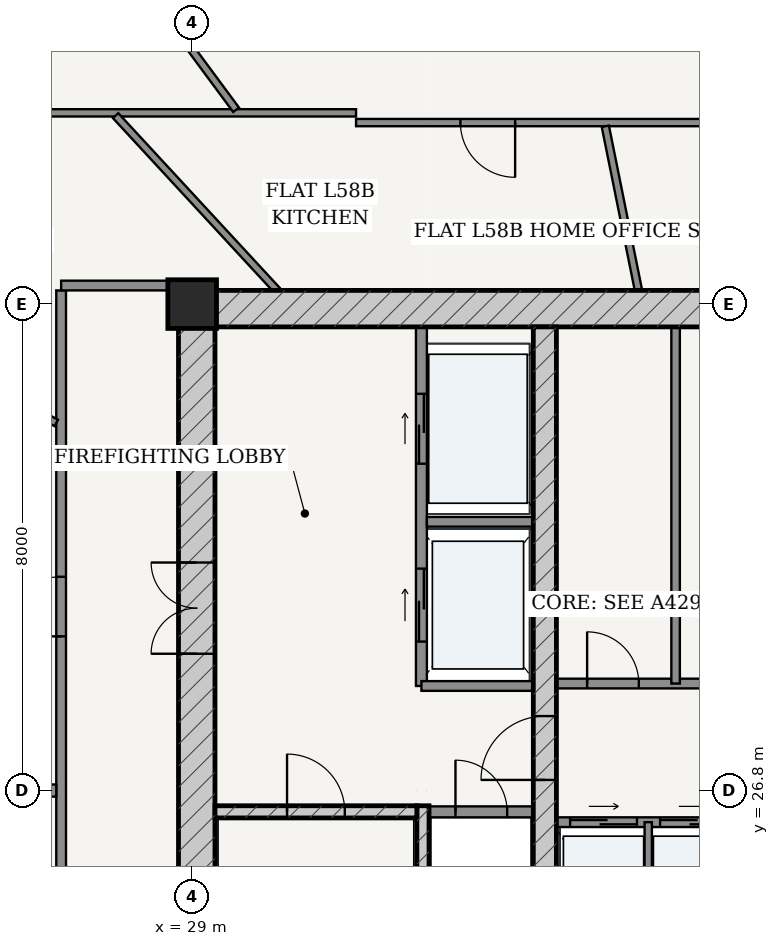
"""IFC4 building model, lengths in metres.
Left out: names, types, materials, properties, quantities, classifications, styles, units other than length and angle.
Written with IfcOpenShell. Run it as: python <this file> out.ifc"""

import sys

from ifc_helpers import new_model, si_unit, direction, frame, frame_2d, origin, origin_2d, place, context, subcontext, project, spatial, rectangle, extrude, source, transform, mapped, element, fill, save


model = new_model("IFC4")
c1 = context("Model", 3, precision=1e-05, world=origin(), true_north=direction((-0.2419218956, 0.970295726276)))
c2 = subcontext(c1, "Body", "Model", "MODEL_VIEW")
j1 = project(units=[si_unit("LENGTHUNIT", "METRE"), si_unit("PLANEANGLEUNIT", "RADIAN")], contexts=[c1])
p1 = place(None, origin())
s1 = spatial("IfcSite", under=j1, at=p1, CompositionType="ELEMENT")
p2 = place(p1, origin())
s2 = spatial("IfcBuilding", under=s1, at=p2, CompositionType="ELEMENT")
p3 = place(p2, frame((0.0, 0.0, 220.8)))
s3 = spatial("IfcBuildingStorey", under=s2, at=p3, CompositionType="ELEMENT", Elevation=220.8)
p4 = place(p3, frame((29.0, 34.8, 0.0), z_axis=(0.0, 0.0, 1.0), x_axis=(1.0, 0.0, 0.0)))
e1 = element("IfcColumn", 1, at=p4, inside=s3, PredefinedType="COLUMN", context=c2, shape_type="SweptSolid", body=[
    extrude(rectangle(XDim=0.8, YDim=0.8, at=origin_2d()), origin(), (0.0, 0.0, 1.0), 3.7),
])
p5 = place(p3, frame((28.775, 34.725, 0.0), z_axis=(0.0, 0.0, 1.0), x_axis=(1.0, 0.0, 0.0)))
e2 = element("IfcWall", 2, at=p5, inside=s3, PredefinedType="SHEAR", context=c2, shape_type="SweptSolid", body=[
    extrude(rectangle(XDim=18.45, YDim=0.6, at=frame_2d((9.225, 0.0))), origin(), (0.0, 0.0, 1.0), 3.435),
])
p6 = place(p3, frame((29.075, 19.175, 0.0), z_axis=(0.0, 0.0, 1.0), x_axis=(0.0, 1.0, 0.0)))
e3 = element("IfcWall", 3, at=p6, inside=s3, PredefinedType="SHEAR", context=c2, shape_type="SweptSolid", body=[
    extrude(rectangle(XDim=15.25, YDim=0.6, at=frame_2d((7.625, 0.0))), origin(), (0.0, 0.0, 1.0), 3.435),
])
p7 = place(p6, frame((9.875, 0.0, 0.0)))
e4 = element("IfcOpeningElement", 4, at=p7, cuts=e3, PredefinedType="OPENING", context=c2, shape_type="SweptSolid", body=[
    extrude(rectangle(XDim=1.5, YDim=2.2, at=frame_2d((0.75, 1.1))), frame((0.0, 0.31, 0.0), z_axis=(0.0, -1.0, 0.0), x_axis=(1.0, 0.0, 0.0)), (0.0, 0.0, 1.0), 0.62),
])
p8 = place(p3, frame((32.795, 19.175, 0.0), z_axis=(0.0, 0.0, 1.0), x_axis=(0.0, 1.0, 0.0)))
e5 = element("IfcWall", 5, at=p8, inside=s3, PredefinedType="SOLIDWALL", context=c2, shape_type="SweptSolid", body=[
    extrude(rectangle(XDim=7.375, YDim=0.2, at=frame_2d((3.688, 0.0))), origin(), (0.0, 0.0, 1.0), 3.435),
])
p9 = place(p3, frame((29.375, 26.45, 0.0), z_axis=(0.0, 0.0, 1.0), x_axis=(1.0, 0.0, 0.0)))
e6 = element("IfcWall", 6, at=p9, inside=s3, PredefinedType="SOLIDWALL", context=c2, shape_type="SweptSolid", body=[
    extrude(rectangle(XDim=3.32, YDim=0.2, at=frame_2d((1.66, 0.0))), origin(), (0.0, 0.0, 1.0), 3.435),
])
p10 = place(p9, frame((1.185, 0.0, 0.0)))
e7 = element("IfcOpeningElement", 7, at=p10, cuts=e6, PredefinedType="OPENING", context=c2, shape_type="SweptSolid", body=[
    extrude(rectangle(XDim=0.95, YDim=2.15, at=frame_2d((0.475, 1.075))), frame((0.0, 0.11, 0.0), z_axis=(0.0, -1.0, 0.0), x_axis=(1.0, 0.0, 0.0)), (0.0, 0.0, 1.0), 0.22),
])
p11 = place(p3, frame((34.8, 19.175, 0.0), z_axis=(0.0, 0.0, 1.0), x_axis=(0.0, 1.0, 0.0)))
e8 = element("IfcWall", 8, at=p11, inside=s3, PredefinedType="SHEAR", context=c2, shape_type="SweptSolid", body=[
    extrude(rectangle(XDim=15.25, YDim=0.38, at=frame_2d((7.625, 0.0))), origin(), (0.0, 0.0, 1.0), 3.435),
])
p12 = place(p11, frame((7.8, 0.0, 0.0)))
e9 = element("IfcOpeningElement", 9, at=p12, cuts=e8, PredefinedType="OPENING", context=c2, shape_type="SweptSolid", body=[
    extrude(rectangle(XDim=1.05, YDim=2.15, at=frame_2d((0.525, 1.075))), frame((0.0, 0.2, 0.0), z_axis=(0.0, -1.0, 0.0), x_axis=(1.0, 0.0, 0.0)), (0.0, 0.0, 1.0), 0.4),
])
p13 = place(p3, frame((32.9, 26.45, 0.0), z_axis=(0.0, 0.0, 1.0), x_axis=(1.0, 0.0, 0.0)))
e10 = element("IfcWall", 10, at=p13, inside=s3, PredefinedType="PARTITIONING", context=c2, shape_type="SweptSolid", body=[
    extrude(rectangle(XDim=1.71, YDim=0.18, at=frame_2d((0.855, 0.0))), origin(), (0.0, 0.0, 1.0), 3.435),
])
p14 = place(p13, frame((0.43, 0.0, 0.0)))
e11 = element("IfcOpeningElement", 11, at=p14, cuts=e10, PredefinedType="OPENING", context=c2, shape_type="SweptSolid", body=[
    extrude(rectangle(XDim=0.85, YDim=2.1, at=frame_2d((0.425, 1.05))), frame((0.0, 0.1, 0.0), z_axis=(0.0, -1.0, 0.0), x_axis=(1.0, 0.0, 0.0)), (0.0, 0.0, 1.0), 0.2),
])
p15 = place(p3, frame((32.77, 28.52, 0.0), z_axis=(0.0, 0.0, 1.0), x_axis=(0.0, 1.0, 0.0)))
e12 = element("IfcWall", 12, at=p15, inside=s3, PredefinedType="PARTITIONING", context=c2, shape_type="SweptSolid", body=[
    extrude(rectangle(XDim=5.905, YDim=0.18, at=frame_2d((2.953, 0.0))), origin(), (0.0, 0.0, 1.0), 3.435),
])
p16 = place(p15, frame((3.655, 0.0, 0.0)))
e13 = element("IfcOpeningElement", 13, at=p16, cuts=e12, PredefinedType="OPENING", context=c2, shape_type="SweptSolid", body=[
    extrude(rectangle(XDim=1.15, YDim=2.2, at=frame_2d((0.575, 1.1))), frame((0.0, 0.1, 0.0), z_axis=(0.0, -1.0, 0.0), x_axis=(1.0, 0.0, 0.0)), (0.0, 0.0, 1.0), 0.2),
])
p17 = place(p15, frame((0.73, 0.0, 0.0)))
e14 = element("IfcOpeningElement", 14, at=p17, cuts=e12, PredefinedType="OPENING", context=c2, shape_type="SweptSolid", body=[
    extrude(rectangle(XDim=1.2, YDim=2.25, at=frame_2d((0.6, 1.125))), frame((0.0, 0.1, 0.0), z_axis=(0.0, -1.0, 0.0), x_axis=(1.0, 0.0, 0.0)), (0.0, 0.0, 1.0), 0.2),
])
p18 = place(p3, frame((32.86, 31.22, 0.0), z_axis=(0.0, 0.0, 1.0), x_axis=(1.0, 0.0, 0.0)))
e15 = element("IfcWall", 15, at=p18, inside=s3, PredefinedType="PARTITIONING", context=c2, shape_type="SweptSolid", body=[
    extrude(rectangle(XDim=1.75, YDim=0.16, at=frame_2d((0.875, 0.0))), origin(), (0.0, 0.0, 1.0), 3.435),
])
p19 = place(p3, frame((32.77, 28.52, 0.0), z_axis=(0.0, 0.0, 1.0), x_axis=(1.0, 0.0, 0.0)))
e16 = element("IfcWall", 16, at=p19, inside=s3, PredefinedType="PARTITIONING", context=c2, shape_type="SweptSolid", body=[
    extrude(rectangle(XDim=1.84, YDim=0.16, at=frame_2d((0.92, 0.0))), origin(), (0.0, 0.0, 1.0), 3.435),
])
p20 = place(p3, frame((34.99, 28.56, 0.0), z_axis=(0.0, 0.0, 1.0), x_axis=(1.0, 0.0, 0.0)))
e17 = element("IfcWall", 17, at=p20, inside=s3, PredefinedType="PARTITIONING", context=c2, shape_type="SweptSolid", body=[
    extrude(rectangle(XDim=6.02, YDim=0.16, at=frame_2d((3.01, 0.0))), origin(), (0.0, 0.0, 1.0), 3.435),
])
p21 = place(p20, frame((0.505, 0.0, 0.0)))
e18 = element("IfcOpeningElement", 18, at=p21, cuts=e17, PredefinedType="OPENING", context=c2, shape_type="SweptSolid", body=[
    extrude(rectangle(XDim=0.85, YDim=2.1, at=frame_2d((0.425, 1.05))), frame((0.0, 0.09, 0.0), z_axis=(0.0, -1.0, 0.0), x_axis=(1.0, 0.0, 0.0)), (0.0, 0.0, 1.0), 0.18),
])
p22 = place(p20, frame((2.58, 0.0, 0.0)))
e19 = element("IfcOpeningElement", 19, at=p22, cuts=e17, PredefinedType="OPENING", context=c2, shape_type="SweptSolid", body=[
    extrude(rectangle(XDim=0.86, YDim=2.1, at=frame_2d((0.43, 1.05))), frame((0.0, 0.09, 0.0), z_axis=(0.0, -1.0, 0.0), x_axis=(1.0, 0.0, 0.0)), (0.0, 0.0, 1.0), 0.18),
])
p23 = place(p20, frame((4.665, 0.0, 0.0)))
e20 = element("IfcOpeningElement", 20, at=p23, cuts=e17, PredefinedType="OPENING", context=c2, shape_type="SweptSolid", body=[
    extrude(rectangle(XDim=0.85, YDim=2.1, at=frame_2d((0.425, 1.05))), frame((0.0, 0.09, 0.0), z_axis=(0.0, -1.0, 0.0), x_axis=(1.0, 0.0, 0.0)), (0.0, 0.0, 1.0), 0.18),
])
p24 = place(p3, frame((36.95, 28.56, 0.0), z_axis=(0.0, 0.0, 1.0), x_axis=(0.0, 1.0, 0.0)))
e21 = element("IfcWall", 21, at=p24, inside=s3, PredefinedType="PARTITIONING", context=c2, shape_type="SweptSolid", body=[
    extrude(rectangle(XDim=5.865, YDim=0.14, at=frame_2d((2.933, 0.0))), origin(), (0.0, 0.0, 1.0), 3.435),
])
p25 = place(p3, frame((34.99, 26.28, 0.0), z_axis=(0.0, 0.0, 1.0), x_axis=(1.0, 0.0, 0.0)))
e22 = element("IfcWall", 22, at=p25, inside=s3, PredefinedType="PARTITIONING", context=c2, shape_type="SweptSolid", body=[
    extrude(rectangle(XDim=6.02, YDim=0.16, at=frame_2d((3.01, 0.0))), origin(), (0.0, 0.0, 1.0), 3.435),
])
p26 = place(p25, frame((0.225, 0.0, 0.0)))
e23 = element("IfcOpeningElement", 23, at=p26, cuts=e22, PredefinedType="OPENING", context=c2, shape_type="SweptSolid", body=[
    extrude(rectangle(XDim=1.1, YDim=2.2, at=frame_2d((0.55, 1.1))), frame((0.0, 0.09, 0.0), z_axis=(0.0, -1.0, 0.0), x_axis=(1.0, 0.0, 0.0)), (0.0, 0.0, 1.0), 0.18),
])
p27 = place(p25, frame((1.705, 0.0, 0.0)))
e24 = element("IfcOpeningElement", 24, at=p27, cuts=e22, PredefinedType="OPENING", context=c2, shape_type="SweptSolid", body=[
    extrude(rectangle(XDim=1.1, YDim=2.2, at=frame_2d((0.55, 1.1))), frame((0.0, 0.09, 0.0), z_axis=(0.0, -1.0, 0.0), x_axis=(1.0, 0.0, 0.0)), (0.0, 0.0, 1.0), 0.18),
])
p28 = place(p3, frame((36.5, 23.72, 0.0), z_axis=(0.0, 0.0, 1.0), x_axis=(0.0, 1.0, 0.0)))
e25 = element("IfcWall", 25, at=p28, inside=s3, PredefinedType="PARTITIONING", context=c2, shape_type="SweptSolid", body=[
    extrude(rectangle(XDim=2.56, YDim=0.12, at=frame_2d((1.28, 0.0))), origin(), (0.0, 0.0, 1.0), 3.435),
])
p29 = place(p3, frame((26.845, 24.4, 0.0), z_axis=(0.0, 0.0, 1.0), x_axis=(0.0, 1.0, 0.0)))
e26 = element("IfcWall", 26, at=p29, inside=s3, PredefinedType="PARTITIONING", context=c2, shape_type="SweptSolid", body=[
    extrude(rectangle(XDim=10.625, YDim=0.16, at=frame_2d((5.312, 0.0))), origin(), (0.0, 0.0, 1.0), 2.951),
])
p30 = place(p29, frame((4.936, 0.0, 0.0)))
e27 = element("IfcOpeningElement", 27, at=p30, cuts=e26, PredefinedType="OPENING", context=c2, shape_type="SweptSolid", body=[
    extrude(rectangle(XDim=0.98, YDim=2.2, at=frame_2d((0.49, 1.1))), frame((0.0, 0.09, 0.0), z_axis=(0.0, -1.0, 0.0), x_axis=(1.0, 0.0, 0.0)), (0.0, 0.0, 1.0), 0.18),
])
p31 = place(p3, frame((26.845, 35.105, 0.0), z_axis=(0.0, 0.0, 1.0), x_axis=(1.0, 0.0, 0.0)))
e28 = element("IfcWall", 28, at=p31, inside=s3, PredefinedType="PARTITIONING", context=c2, shape_type="SweptSolid", body=[
    extrude(rectangle(XDim=1.93, YDim=0.16, at=frame_2d((0.965, 0.0))), origin(), (0.0, 0.0, 1.0), 3.435),
])
p32 = place(p3, frame((24.005, 37.945, 0.0), z_axis=(0.0, 0.0, 1.0), x_axis=(1.0, 0.0, 0.0)))
e29 = element("IfcWall", 29, at=p32, inside=s3, PredefinedType="PARTITIONING", context=c2, shape_type="SweptSolid", body=[
    extrude(rectangle(XDim=7.69, YDim=0.12, at=frame_2d((3.845, 0.0))), origin(), (0.0, 0.0, 1.0), 2.951),
])
p33 = place(p3, frame((31.695, 37.785, 0.0), z_axis=(0.0, 0.0, 1.0), x_axis=(1.0, 0.0, 0.0)))
e30 = element("IfcWall", 30, at=p33, inside=s3, PredefinedType="PARTITIONING", context=c2, shape_type="SweptSolid", body=[
    extrude(rectangle(XDim=8.621, YDim=0.12, at=frame_2d((4.311, 0.0))), origin(), (0.0, 0.0, 1.0), 2.951),
])
p34 = place(p33, frame((1.716, 0.0, 0.0)))
e31 = element("IfcOpeningElement", 31, at=p34, cuts=e30, PredefinedType="OPENING", context=c2, shape_type="SweptSolid", body=[
    extrude(rectangle(XDim=0.9, YDim=2.15, at=frame_2d((0.45, 1.075))), frame((0.0, 0.07, 0.0), z_axis=(0.0, -1.0, 0.0), x_axis=(1.0, 0.0, 0.0)), (0.0, 0.0, 1.0), 0.14),
])
p35 = place(p33, frame((5.784, 0.0, 0.0)))
e32 = element("IfcOpeningElement", 32, at=p35, cuts=e30, PredefinedType="OPENING", context=c2, shape_type="SweptSolid", body=[
    extrude(rectangle(XDim=0.9, YDim=2.15, at=frame_2d((0.45, 1.075))), frame((0.0, 0.07, 0.0), z_axis=(0.0, -1.0, 0.0), x_axis=(1.0, 0.0, 0.0)), (0.0, 0.0, 1.0), 0.14),
])
p36 = place(p3, frame((29.722, 37.995, 0.0), z_axis=(0.0, 0.0, 1.0), x_axis=(-0.594518724985, 0.80408176552, 0.0)))
e33 = element("IfcWall", 33, at=p36, inside=s3, PredefinedType="PARTITIONING", context=c2, shape_type="SweptSolid", body=[
    extrude(rectangle(XDim=6.344, YDim=0.12, at=frame_2d((3.172, 0.0))), origin(), (0.0, 0.0, 1.0), 2.951),
])
p37 = place(p36, frame((1.715, 0.0, 0.0)))
e34 = element("IfcOpeningElement", 34, at=p37, cuts=e33, PredefinedType="OPENING", context=c2, shape_type="SweptSolid", body=[
    extrude(rectangle(XDim=0.9, YDim=2.15, at=frame_2d((0.45, 1.075))), frame((0.0, 0.07, 0.0), z_axis=(0.0, -1.0, 0.0), x_axis=(1.0, 0.0, 0.0)), (0.0, 0.0, 1.0), 0.14),
])
p38 = place(p3, frame((36.339, 35.027, 0.0), z_axis=(0.0, 0.0, 1.0), x_axis=(-0.197856196381, 0.980231057228, 0.0)))
e35 = element("IfcWall", 35, at=p38, inside=s3, PredefinedType="PARTITIONING", context=c2, shape_type="SweptSolid", body=[
    extrude(rectangle(XDim=2.752, YDim=0.12, at=frame_2d((1.376, 0.0))), origin(), (0.0, 0.0, 1.0), 2.52),
])
p39 = place(p3, frame((30.396, 35.026, 0.0), z_axis=(0.0, 0.0, 1.0), x_axis=(-0.678759446058, 0.734360684124, 0.0)))
e36 = element("IfcWall", 36, at=p39, inside=s3, PredefinedType="PARTITIONING", context=c2, shape_type="SweptSolid", body=[
    extrude(rectangle(XDim=3.912, YDim=0.12, at=frame_2d((1.956, 0.0))), origin(), (0.0, 0.0, 1.0), 2.951),
])
p40 = place(p3, frame((26.765, 32.845, 0.0), z_axis=(0.0, 0.0, 1.0), x_axis=(-0.88059355453, 0.473872336943, 0.0)))
e37 = element("IfcWall", 37, at=p40, inside=s3, PredefinedType="PARTITIONING", context=c2, shape_type="SweptSolid", body=[
    extrude(rectangle(XDim=3.072, YDim=0.12, at=frame_2d((1.536, 0.0))), origin(), (0.0, 0.0, 1.0), 3.11),
])
p41 = place(p40, frame((1.106, 0.0, 0.0)))
e38 = element("IfcOpeningElement", 38, at=p41, cuts=e37, PredefinedType="OPENING", context=c2, shape_type="SweptSolid", body=[
    extrude(rectangle(XDim=0.86, YDim=2.15, at=frame_2d((0.43, 1.075))), frame((0.0, 0.07, 0.0), z_axis=(0.0, -1.0, 0.0), x_axis=(1.0, 0.0, 0.0)), (0.0, 0.0, 1.0), 0.14),
])
p42 = place(p3, frame((26.765, 26.8, 0.0), z_axis=(0.0, 0.0, 1.0), x_axis=(-1.0, 0.0, 0.0)))
e39 = element("IfcWall", 39, at=p42, inside=s3, PredefinedType="PARTITIONING", context=c2, shape_type="SweptSolid", body=[
    extrude(rectangle(XDim=10.505, YDim=0.2, at=frame_2d((5.252, 0.0))), origin(), (0.0, 0.0, 1.0), 2.951),
])
m1 = source(origin(), c2, "Body", "SweptSolid", [
    extrude(rectangle(XDim=1.5, YDim=2.2, at=frame_2d((0.75, 1.1))), frame((0.0, 0.025, 0.0), z_axis=(0.0, -1.0, 0.0), x_axis=(1.0, 0.0, 0.0)), (0.0, 0.0, 1.0), 0.05),
])
p43 = place(p7, origin())
e40 = element("IfcDoor", 40, at=p43, inside=s3, OperationType="DOUBLE_DOOR_SINGLE_SWING", PredefinedType="DOOR", context=c2, shape_type="MappedRepresentation", body=[
    mapped(m1, transform((0.0, 0.0, 0.0), scale=1.0)),
])
fill(e4, e40)
m2 = source(origin(), c2, "Body", "SweptSolid", [
    extrude(rectangle(XDim=1.05, YDim=2.15, at=frame_2d((0.525, 1.075))), frame((0.0, 0.025, 0.0), z_axis=(0.0, -1.0, 0.0), x_axis=(1.0, 0.0, 0.0)), (0.0, 0.0, 1.0), 0.05),
])
p44 = place(p12, origin())
e41 = element("IfcDoor", 41, at=p44, inside=s3, OperationType="SINGLE_SWING_LEFT", PredefinedType="DOOR", context=c2, shape_type="MappedRepresentation", body=[
    mapped(m2, transform((0.0, 0.0, 0.0), scale=1.0)),
])
fill(e9, e41)
m3 = source(origin(), c2, "Body", "SweptSolid", [
    extrude(rectangle(XDim=0.95, YDim=2.15, at=frame_2d((0.475, 1.075))), frame((0.0, 0.025, 0.0), z_axis=(0.0, -1.0, 0.0), x_axis=(1.0, 0.0, 0.0)), (0.0, 0.0, 1.0), 0.05),
])
p45 = place(p10, origin())
e42 = element("IfcDoor", 42, at=p45, inside=s3, OperationType="SINGLE_SWING_LEFT", PredefinedType="DOOR", context=c2, shape_type="MappedRepresentation", body=[
    mapped(m3, transform((0.0, 0.0, 0.0), scale=1.0)),
])
fill(e7, e42)
m4 = source(origin(), c2, "Body", "SweptSolid", [
    extrude(rectangle(XDim=0.85, YDim=2.1, at=frame_2d((0.425, 1.05))), frame((0.0, 0.025, 0.0), z_axis=(0.0, -1.0, 0.0), x_axis=(1.0, 0.0, 0.0)), (0.0, 0.0, 1.0), 0.05),
])
p46 = place(p14, origin())
e43 = element("IfcDoor", 43, at=p46, inside=s3, OperationType="SINGLE_SWING_LEFT", PredefinedType="DOOR", context=c2, shape_type="MappedRepresentation", body=[
    mapped(m4, transform((0.0, 0.0, 0.0), scale=1.0)),
])
fill(e11, e43)
p47 = place(p21, origin())
e44 = element("IfcDoor", 44, at=p47, inside=s3, OperationType="SINGLE_SWING_LEFT", PredefinedType="DOOR", context=c2, shape_type="MappedRepresentation", body=[
    mapped(m4, transform((0.0, 0.0, 0.0), scale=1.0)),
])
fill(e18, e44)
m5 = source(origin(), c2, "Body", "SweptSolid", [
    extrude(rectangle(XDim=1.15, YDim=2.2, at=frame_2d((0.575, 1.1))), frame((0.0, 0.025, 0.0), z_axis=(0.0, -1.0, 0.0), x_axis=(1.0, 0.0, 0.0)), (0.0, 0.0, 1.0), 0.05),
])
p48 = place(p16, origin())
e45 = element("IfcDoor", 45, at=p48, inside=s3, OperationType="DOUBLE_DOOR_SLIDING", PredefinedType="DOOR", context=c2, shape_type="MappedRepresentation", body=[
    mapped(m5, transform((0.0, 0.0, 0.0), scale=1.0)),
])
fill(e13, e45)
m6 = source(origin(), c2, "Body", "SweptSolid", [
    extrude(rectangle(XDim=1.2, YDim=2.25, at=frame_2d((0.6, 1.125))), frame((0.0, 0.025, 0.0), z_axis=(0.0, -1.0, 0.0), x_axis=(1.0, 0.0, 0.0)), (0.0, 0.0, 1.0), 0.05),
])
p49 = place(p17, origin())
e46 = element("IfcDoor", 46, at=p49, inside=s3, OperationType="DOUBLE_DOOR_SLIDING", PredefinedType="DOOR", context=c2, shape_type="MappedRepresentation", body=[
    mapped(m6, transform((0.0, 0.0, 0.0), scale=1.0)),
])
fill(e14, e46)
m7 = source(origin(), c2, "Body", "SweptSolid", [
    extrude(rectangle(XDim=1.1, YDim=2.2, at=frame_2d((0.55, 1.1))), frame((0.0, 0.025, 0.0), z_axis=(0.0, -1.0, 0.0), x_axis=(1.0, 0.0, 0.0)), (0.0, 0.0, 1.0), 0.05),
])
p50 = place(p26, origin())
e47 = element("IfcDoor", 47, at=p50, inside=s3, OperationType="DOUBLE_DOOR_SLIDING", PredefinedType="DOOR", context=c2, shape_type="MappedRepresentation", body=[
    mapped(m7, transform((0.0, 0.0, 0.0), scale=1.0)),
])
fill(e23, e47)
p51 = place(p27, origin())
e48 = element("IfcDoor", 48, at=p51, inside=s3, OperationType="DOUBLE_DOOR_SLIDING", PredefinedType="DOOR", context=c2, shape_type="MappedRepresentation", body=[
    mapped(m7, transform((0.0, 0.0, 0.0), scale=1.0)),
])
fill(e24, e48)
m8 = source(origin(), c2, "Body", "SweptSolid", [
    extrude(rectangle(XDim=0.98, YDim=2.2, at=frame_2d((0.49, 1.1))), frame((0.0, 0.025, 0.0), z_axis=(0.0, -1.0, 0.0), x_axis=(1.0, 0.0, 0.0)), (0.0, 0.0, 1.0), 0.05),
])
p52 = place(p30, origin())
e49 = element("IfcDoor", 49, at=p52, inside=s3, OperationType="SINGLE_SWING_LEFT", PredefinedType="DOOR", context=c2, shape_type="MappedRepresentation", body=[
    mapped(m8, transform((0.0, 0.0, 0.0), scale=1.0)),
])
fill(e27, e49)
m9 = source(origin(), c2, "Body", "SweptSolid", [
    extrude(rectangle(XDim=0.9, YDim=2.15, at=frame_2d((0.45, 1.075))), frame((0.0, 0.025, 0.0), z_axis=(0.0, -1.0, 0.0), x_axis=(1.0, 0.0, 0.0)), (0.0, 0.0, 1.0), 0.05),
])
p53 = place(p34, frame((0.9, 0.0, 0.0), z_axis=(0.0, 0.0, 1.0), x_axis=(-1.0, 0.0, 0.0)))
e50 = element("IfcDoor", 50, at=p53, inside=s3, OperationType="SINGLE_SWING_LEFT", PredefinedType="DOOR", context=c2, shape_type="MappedRepresentation", body=[
    mapped(m9, transform((0.0, 0.0, 0.0), scale=1.0)),
])
fill(e31, e50)
save(model, sys.argv[1])
